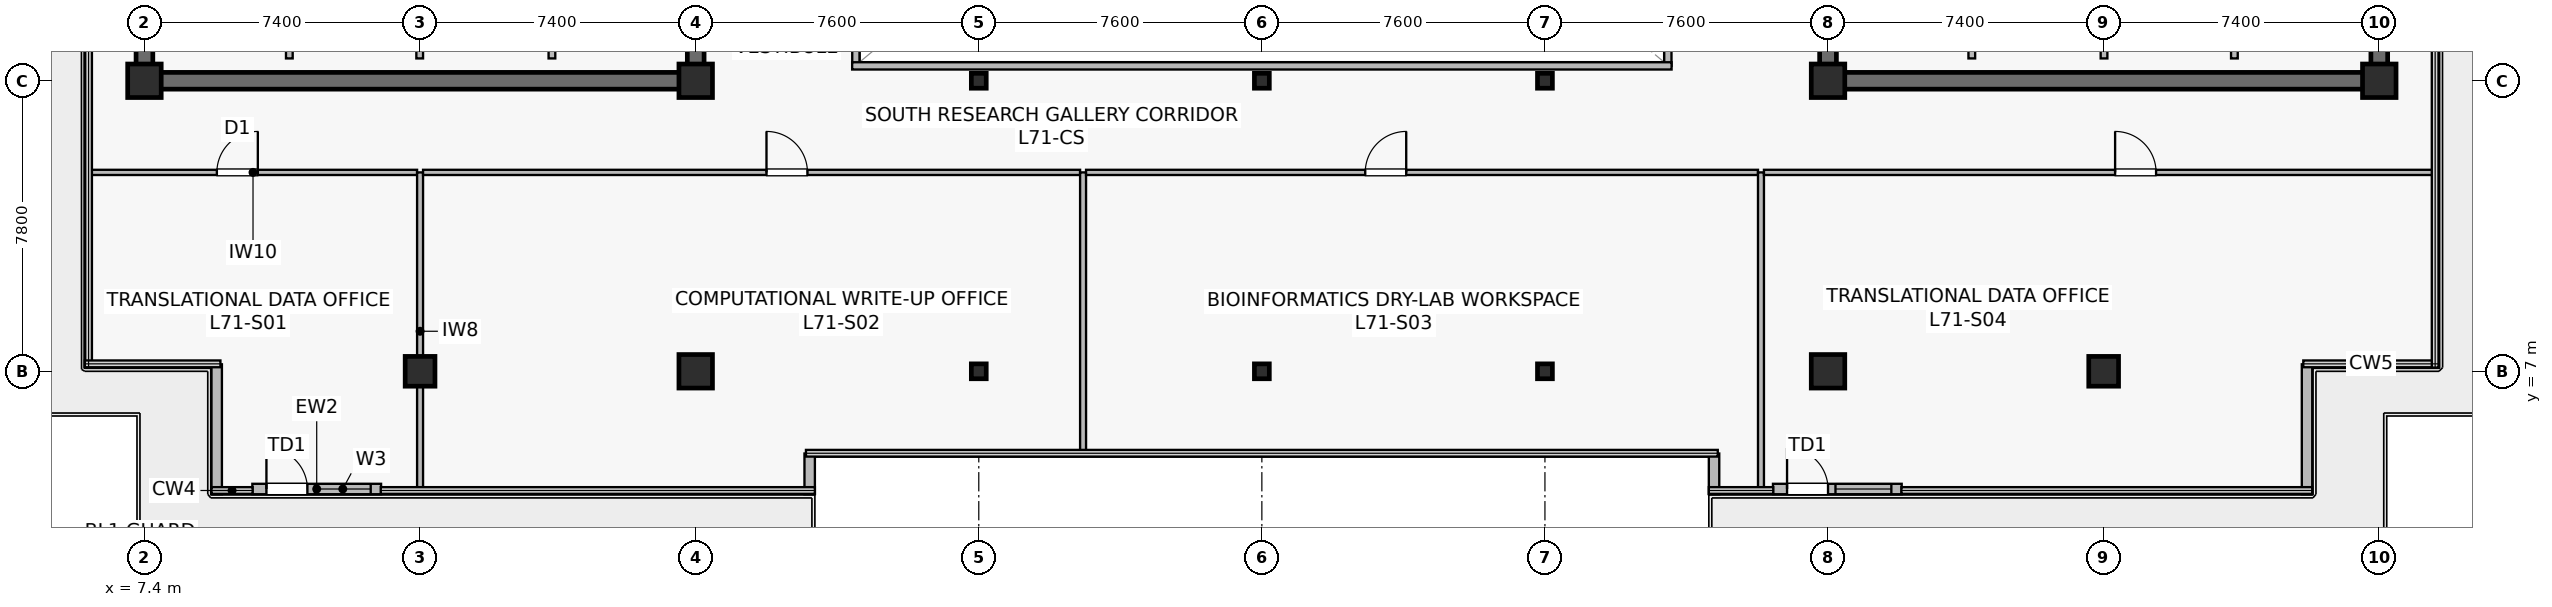
"""IFC4 building model, lengths in metres.
Left out: names, types, materials, properties, quantities, classifications, styles, units other than length and angle.
Written with IfcOpenShell. Run it as: python <this file> out.ifc"""

import sys

from ifc_helpers import new_model, si_unit, direction, frame, frame_2d, origin, origin_2d, place, context, subcontext, project, spatial, rectangle, i_section, extrude, source, transform, mapped, element, fill, save


model = new_model("IFC4")
c1 = context("Model", 3, precision=1e-05, world=origin(), true_north=direction((0.0, 1.0)))
c2 = subcontext(c1, "Body", "Model", "MODEL_VIEW")
j1 = project(units=[si_unit("LENGTHUNIT", "METRE"), si_unit("PLANEANGLEUNIT", "RADIAN")], contexts=[c1])
p1 = place(None, origin())
s1 = spatial("IfcSite", under=j1, at=p1, CompositionType="ELEMENT")
p2 = place(p1, origin())
s2 = spatial("IfcBuilding", under=s1, at=p2, CompositionType="ELEMENT")
p3 = place(p2, frame((0.0, 0.0, 297.6)))
s3 = spatial("IfcBuildingStorey", under=s2, at=p3, CompositionType="ELEMENT", Elevation=297.6)
p4 = place(p3, frame((7.175, 14.8, 0.0), z_axis=(0.0, 0.0, 1.0), x_axis=(1.0, 0.0, 0.0)))
e1 = element("IfcWall", 1, at=p4, inside=s3, PredefinedType="SHEAR", context=c2, shape_type="SweptSolid", body=[
    extrude(rectangle(XDim=15.25, YDim=0.45, at=frame_2d((7.625, 0.0))), origin(), (0.0, 0.0, 1.0), 3.9),
])
p5 = place(p3, frame((7.4, 15.025, 0.0), z_axis=(0.0, 0.0, 1.0), x_axis=(0.0, 1.0, 0.0)))
e2 = element("IfcWall", 2, at=p5, inside=s3, PredefinedType="SHEAR", context=c2, shape_type="SweptSolid", body=[
    extrude(rectangle(XDim=18.55, YDim=0.45, at=frame_2d((9.275, 0.0))), origin(), (0.0, 0.0, 1.0), 3.9),
])
p6 = place(p3, frame((22.2, 15.025, 0.0), z_axis=(0.0, 0.0, 1.0), x_axis=(0.0, 1.0, 0.0)))
e3 = element("IfcWall", 3, at=p6, inside=s3, PredefinedType="SHEAR", context=c2, shape_type="SweptSolid", body=[
    extrude(rectangle(XDim=18.55, YDim=0.45, at=frame_2d((9.275, 0.0))), origin(), (0.0, 0.0, 1.0), 3.9),
])
p7 = place(p6, frame((3.525, 0.0, 0.0)))
e4 = element("IfcOpeningElement", 4, at=p7, cuts=e3, PredefinedType="OPENING", context=c2, shape_type="SweptSolid", body=[
    extrude(rectangle(XDim=1.42, YDim=2.2, at=frame_2d((0.71, 1.1))), frame((0.0, 0.235, 0.0), z_axis=(0.0, -1.0, 0.0), x_axis=(1.0, 0.0, 0.0)), (0.0, 0.0, 1.0), 0.47),
])
p8 = place(p3, frame((52.375, 14.8, 0.0), z_axis=(0.0, 0.0, 1.0), x_axis=(1.0, 0.0, 0.0)))
e5 = element("IfcWall", 5, at=p8, inside=s3, PredefinedType="SHEAR", context=c2, shape_type="SweptSolid", body=[
    extrude(rectangle(XDim=15.25, YDim=0.45, at=frame_2d((7.625, 0.0))), origin(), (0.0, 0.0, 1.0), 3.9),
])
p9 = place(p3, frame((52.6, 15.025, 0.0), z_axis=(0.0, 0.0, 1.0), x_axis=(0.0, 1.0, 0.0)))
e6 = element("IfcWall", 6, at=p9, inside=s3, PredefinedType="SHEAR", context=c2, shape_type="SweptSolid", body=[
    extrude(rectangle(XDim=18.55, YDim=0.45, at=frame_2d((9.275, 0.0))), origin(), (0.0, 0.0, 1.0), 3.9),
])
p10 = place(p9, frame((3.525, 0.0, 0.0)))
e7 = element("IfcOpeningElement", 7, at=p10, cuts=e6, PredefinedType="OPENING", context=c2, shape_type="SweptSolid", body=[
    extrude(rectangle(XDim=1.42, YDim=2.2, at=frame_2d((0.71, 1.1))), frame((0.0, 0.235, 0.0), z_axis=(0.0, -1.0, 0.0), x_axis=(1.0, 0.0, 0.0)), (0.0, 0.0, 1.0), 0.47),
])
p11 = place(p3, frame((67.4, 15.025, 0.0), z_axis=(0.0, 0.0, 1.0), x_axis=(0.0, 1.0, 0.0)))
e8 = element("IfcWall", 8, at=p11, inside=s3, PredefinedType="SHEAR", context=c2, shape_type="SweptSolid", body=[
    extrude(rectangle(XDim=18.55, YDim=0.45, at=frame_2d((9.275, 0.0))), origin(), (0.0, 0.0, 1.0), 3.9),
])
m1 = source(origin(), c2, "Body", "SweptSolid", [
    extrude(rectangle(XDim=0.8, YDim=0.8, at=origin_2d()), origin(), (0.0, 0.0, 1.0), 4.2),
])
p12 = place(p3, frame((14.8, 7.0, 0.0), z_axis=(0.0, 0.0, 1.0), x_axis=(1.0, 0.0, 0.0)))
e9 = element("IfcColumn", 9, at=p12, inside=s3, PredefinedType="COLUMN", context=c2, shape_type="MappedRepresentation", body=[
    mapped(m1, transform((0.0, 0.0, 0.0), scale=1.0)),
])
m2 = source(origin(), c2, "Body", "SweptSolid", [
    extrude(rectangle(XDim=0.9, YDim=0.9, at=origin_2d()), origin(), (0.0, 0.0, 1.0), 4.2),
])
for number, where, z_axis, x_axis in (
    (10, (22.2, 7.0, 0.0), (0.0, 0.0, 1.0), (1.0, 0.0, 0.0)),
    (11, (7.4, 14.8, 0.0), (0.0, 0.0, 1.0), (1.0, 0.0, 0.0)),
    (12, (22.2, 14.8, 0.0), (0.0, 0.0, 1.0), (1.0, 0.0, 0.0)),
    (13, (52.6, 7.0, 0.0), (0.0, 0.0, 1.0), (1.0, 0.0, 0.0)),
):
    element("IfcColumn", number, at=place(p3, frame(where, z_axis=z_axis, x_axis=x_axis)), inside=s3, PredefinedType="COLUMN", context=c2, shape_type="MappedRepresentation", body=[
        mapped(m2, transform((0.0, 0.0, 0.0), scale=1.0)),
    ])
p13 = place(p3, frame((60.0, 7.0, 0.0), z_axis=(0.0, 0.0, 1.0), x_axis=(1.0, 0.0, 0.0)))
e14 = element("IfcColumn", 14, at=p13, inside=s3, PredefinedType="COLUMN", context=c2, shape_type="MappedRepresentation", body=[
    mapped(m1, transform((0.0, 0.0, 0.0), scale=1.0)),
])
for number, where, z_axis, x_axis in (
    (15, (52.6, 14.8, 0.0), (0.0, 0.0, 1.0), (1.0, 0.0, 0.0)),
    (16, (67.4, 14.8, 0.0), (0.0, 0.0, 1.0), (1.0, 0.0, 0.0)),
):
    element("IfcColumn", number, at=place(p3, frame(where, z_axis=z_axis, x_axis=x_axis)), inside=s3, PredefinedType="COLUMN", context=c2, shape_type="MappedRepresentation", body=[
        mapped(m2, transform((0.0, 0.0, 0.0), scale=1.0)),
    ])
m3 = source(origin(), c2, "Body", "SweptSolid", [
    extrude(i_section(OverallWidth=0.4, OverallDepth=0.4, WebThickness=0.021, FlangeThickness=0.021, at=origin_2d()), origin(), (0.0, 0.0, 1.0), 4.2),
])
for number, where, z_axis, x_axis in (
    (17, (29.8, 7.0, 0.0), (0.0, 0.0, 1.0), (1.0, 0.0, 0.0)),
    (18, (29.8, 14.8, 0.0), (0.0, 0.0, 1.0), (1.0, 0.0, 0.0)),
    (19, (37.4, 7.0, 0.0), (0.0, 0.0, 1.0), (1.0, 0.0, 0.0)),
    (20, (37.4, 14.8, 0.0), (0.0, 0.0, 1.0), (1.0, 0.0, 0.0)),
    (21, (45.0, 7.0, 0.0), (0.0, 0.0, 1.0), (1.0, 0.0, 0.0)),
    (22, (45.0, 14.8, 0.0), (0.0, 0.0, 1.0), (1.0, 0.0, 0.0)),
):
    element("IfcColumn", number, at=place(p3, frame(where, z_axis=z_axis, x_axis=x_axis)), inside=s3, PredefinedType="COLUMN", context=c2, shape_type="MappedRepresentation", body=[
        mapped(m3, transform((0.0, 0.0, 0.0), scale=1.0)),
    ])
p14 = place(p3, frame((10.297, 3.84, 0.0), z_axis=(0.0, 0.0, 1.0), x_axis=(1.0, 0.0, 0.0)))
e23 = element("IfcWall", 23, at=p14, inside=s3, PredefinedType="STANDARD", context=c2, shape_type="SweptSolid", body=[
    extrude(rectangle(XDim=3.456, YDim=0.28, at=frame_2d((1.728, 0.0))), origin(), (0.0, 0.0, 1.0), 3.9),
])
p15 = place(p14, frame((0.378, 0.0, 0.0)))
e24 = element("IfcOpeningElement", 24, at=p15, cuts=e23, PredefinedType="OPENING", context=c2, shape_type="SweptSolid", body=[
    extrude(rectangle(XDim=1.1, YDim=2.2, at=frame_2d((0.55, 1.1))), frame((0.0, 0.15, 0.0), z_axis=(0.0, -1.0, 0.0), x_axis=(1.0, 0.0, 0.0)), (0.0, 0.0, 1.0), 0.3),
])
p16 = place(p14, frame((1.678, 0.0, 0.9)))
e25 = element("IfcOpeningElement", 25, at=p16, cuts=e23, PredefinedType="OPENING", context=c2, shape_type="SweptSolid", body=[
    extrude(rectangle(XDim=1.5, YDim=2.2, at=frame_2d((0.75, 1.1))), frame((0.0, 0.15, 0.0), z_axis=(0.0, -1.0, 0.0), x_axis=(1.0, 0.0, 0.0)), (0.0, 0.0, 1.0), 0.3),
])
p17 = place(p3, frame((51.122, 3.84, 0.0), z_axis=(0.0, 0.0, 1.0), x_axis=(1.0, 0.0, 0.0)))
e26 = element("IfcWall", 26, at=p17, inside=s3, PredefinedType="STANDARD", context=c2, shape_type="SweptSolid", body=[
    extrude(rectangle(XDim=3.456, YDim=0.28, at=frame_2d((1.728, 0.0))), origin(), (0.0, 0.0, 1.0), 3.9),
])
p18 = place(p17, frame((0.378, 0.0, 0.0)))
e27 = element("IfcOpeningElement", 27, at=p18, cuts=e26, PredefinedType="OPENING", context=c2, shape_type="SweptSolid", body=[
    extrude(rectangle(XDim=1.1, YDim=2.2, at=frame_2d((0.55, 1.1))), frame((0.0, 0.15, 0.0), z_axis=(0.0, -1.0, 0.0), x_axis=(1.0, 0.0, 0.0)), (0.0, 0.0, 1.0), 0.3),
])
p19 = place(p17, frame((1.678, 0.0, 0.9)))
e28 = element("IfcOpeningElement", 28, at=p19, cuts=e26, PredefinedType="OPENING", context=c2, shape_type="SweptSolid", body=[
    extrude(rectangle(XDim=1.5, YDim=2.2, at=frame_2d((0.75, 1.1))), frame((0.0, 0.15, 0.0), z_axis=(0.0, -1.0, 0.0), x_axis=(1.0, 0.0, 0.0)), (0.0, 0.0, 1.0), 0.3),
])
for number, where, z_axis, x_axis in (
    (29, (25.26, 3.7, 0.0), (0.0, 0.0, 1.0), (0.0, 1.0, 0.0)),
    (30, (49.54, 4.793, 0.0), (0.0, 0.0, 1.0), (0.0, -1.0, 0.0)),
):
    element("IfcWall", number, at=place(p3, frame(where, z_axis=z_axis, x_axis=x_axis)), inside=s3, PredefinedType="STANDARD", context=c2, shape_type="SweptSolid", body=[
        extrude(rectangle(XDim=1.093, YDim=0.28, at=frame_2d((0.546, 0.0))), origin(), (0.0, 0.0, 1.0), 3.9),
    ])
for number, where, z_axis, x_axis in (
    (31, (65.46, 3.7, 0.0), (0.0, 0.0, 1.0), (0.0, 1.0, 0.0)),
    (32, (9.34, 7.188, 0.0), (0.0, 0.0, 1.0), (0.0, -1.0, 0.0)),
):
    element("IfcWall", number, at=place(p3, frame(where, z_axis=z_axis, x_axis=x_axis)), inside=s3, PredefinedType="STANDARD", context=c2, shape_type="SweptSolid", body=[
        extrude(rectangle(XDim=3.488, YDim=0.28, at=frame_2d((1.744, 0.0))), origin(), (0.0, 0.0, 1.0), 3.9),
    ])
p20 = place(p3, frame((11.29, 15.4, 0.0), z_axis=(0.0, 0.0, 1.0), x_axis=(0.0, 1.0, 0.0)))
e33 = element("IfcWall", 33, at=p20, inside=s3, PredefinedType="SOLIDWALL", context=c2, shape_type="SweptSolid", body=[
    extrude(rectangle(XDim=2.4, YDim=0.18, at=frame_2d((1.2, 0.0))), origin(), (0.0, 0.0, 1.0), 3.9),
])
p21 = place(p3, frame((14.79, 15.4, 0.0), z_axis=(0.0, 0.0, 1.0), x_axis=(0.0, 1.0, 0.0)))
e34 = element("IfcWall", 34, at=p21, inside=s3, PredefinedType="SOLIDWALL", context=c2, shape_type="SweptSolid", body=[
    extrude(rectangle(XDim=2.4, YDim=0.18, at=frame_2d((1.2, 0.0))), origin(), (0.0, 0.0, 1.0), 3.297),
])
for number, where, z_axis, x_axis in (
    (35, (18.34, 15.4, 0.0), (0.0, 0.0, 1.0), (0.0, 1.0, 0.0)),
    (36, (63.51, 15.4, 0.0), (0.0, 0.0, 1.0), (0.0, 1.0, 0.0)),
):
    element("IfcWall", number, at=place(p3, frame(where, z_axis=z_axis, x_axis=x_axis)), inside=s3, PredefinedType="SOLIDWALL", context=c2, shape_type="SweptSolid", body=[
        extrude(rectangle(XDim=2.4, YDim=0.18, at=frame_2d((1.2, 0.0))), origin(), (0.0, 0.0, 1.0), 3.9),
    ])
p22 = place(p3, frame((60.01, 15.4, 0.0), z_axis=(0.0, 0.0, 1.0), x_axis=(0.0, 1.0, 0.0)))
e37 = element("IfcWall", 37, at=p22, inside=s3, PredefinedType="SOLIDWALL", context=c2, shape_type="SweptSolid", body=[
    extrude(rectangle(XDim=2.4, YDim=0.18, at=frame_2d((1.2, 0.0))), origin(), (0.0, 0.0, 1.0), 3.297),
])
p23 = place(p3, frame((56.46, 15.4, 0.0), z_axis=(0.0, 0.0, 1.0), x_axis=(0.0, 1.0, 0.0)))
e38 = element("IfcWall", 38, at=p23, inside=s3, PredefinedType="SOLIDWALL", context=c2, shape_type="SweptSolid", body=[
    extrude(rectangle(XDim=2.4, YDim=0.18, at=frame_2d((1.2, 0.0))), origin(), (0.0, 0.0, 1.0), 3.9),
])
p24 = place(p3, frame((26.5, 15.2, 0.0), z_axis=(0.0, 0.0, 1.0), x_axis=(0.0, 1.0, 0.0)))
e39 = element("IfcWall", 39, at=p24, inside=s3, PredefinedType="SOLIDWALL", context=c2, shape_type="SweptSolid", body=[
    extrude(rectangle(XDim=18.2, YDim=0.195, at=frame_2d((9.1, 0.0))), origin(), (0.0, 0.0, 1.0), 3.9),
])
p25 = place(p24, frame((1.8, 0.0, 0.9)))
e40 = element("IfcOpeningElement", 40, at=p25, cuts=e39, PredefinedType="OPENING", context=c2, shape_type="SweptSolid", body=[
    extrude(rectangle(XDim=1.2, YDim=1.35, at=frame_2d((0.6, 0.675))), frame((0.0, 0.107, 0.0), z_axis=(0.0, -1.0, 0.0), x_axis=(1.0, 0.0, 0.0)), (0.0, 0.0, 1.0), 0.215),
])
p26 = place(p24, frame((13.2, 0.0, 0.9)))
e41 = element("IfcOpeningElement", 41, at=p26, cuts=e39, PredefinedType="OPENING", context=c2, shape_type="SweptSolid", body=[
    extrude(rectangle(XDim=1.2, YDim=1.35, at=frame_2d((0.6, 0.675))), frame((0.0, 0.107, 0.0), z_axis=(0.0, -1.0, 0.0), x_axis=(1.0, 0.0, 0.0)), (0.0, 0.0, 1.0), 0.215),
])
p27 = place(p3, frame((48.3, 15.2, 0.0), z_axis=(0.0, 0.0, 1.0), x_axis=(0.0, 1.0, 0.0)))
e42 = element("IfcWall", 42, at=p27, inside=s3, PredefinedType="SOLIDWALL", context=c2, shape_type="SweptSolid", body=[
    extrude(rectangle(XDim=18.2, YDim=0.195, at=frame_2d((9.1, 0.0))), origin(), (0.0, 0.0, 1.0), 3.9),
])
p28 = place(p27, frame((1.8, 0.0, 0.9)))
e43 = element("IfcOpeningElement", 43, at=p28, cuts=e42, PredefinedType="OPENING", context=c2, shape_type="SweptSolid", body=[
    extrude(rectangle(XDim=1.2, YDim=1.35, at=frame_2d((0.6, 0.675))), frame((0.0, 0.107, 0.0), z_axis=(0.0, -1.0, 0.0), x_axis=(1.0, 0.0, 0.0)), (0.0, 0.0, 1.0), 0.215),
])
p29 = place(p27, frame((13.2, 0.0, 0.9)))
e44 = element("IfcOpeningElement", 44, at=p29, cuts=e42, PredefinedType="OPENING", context=c2, shape_type="SweptSolid", body=[
    extrude(rectangle(XDim=1.2, YDim=1.35, at=frame_2d((0.6, 0.675))), frame((0.0, 0.107, 0.0), z_axis=(0.0, -1.0, 0.0), x_axis=(1.0, 0.0, 0.0)), (0.0, 0.0, 1.0), 0.215),
])
p30 = place(p3, frame((26.4, 15.2, 0.0), z_axis=(0.0, 0.0, 1.0), x_axis=(1.0, 0.0, 0.0)))
e45 = element("IfcWall", 45, at=p30, inside=s3, PredefinedType="SOLIDWALL", context=c2, shape_type="SweptSolid", body=[
    extrude(rectangle(XDim=22.0, YDim=0.195, at=frame_2d((11.0, 0.0))), origin(), (0.0, 0.0, 1.0), 3.9),
])
p31 = place(p3, frame((5.91, 12.34, 0.0), z_axis=(0.0, 0.0, 1.0), x_axis=(1.0, 0.0, 0.0)))
e46 = element("IfcWall", 46, at=p31, inside=s3, PredefinedType="PARTITIONING", context=c2, shape_type="SweptSolid", body=[
    extrude(rectangle(XDim=8.81, YDim=0.14, at=frame_2d((4.405, 0.0))), origin(), (0.0, 0.0, 1.0), 3.297),
])
p32 = place(p31, frame((3.434, 0.0, 0.0)))
e47 = element("IfcOpeningElement", 47, at=p32, cuts=e46, PredefinedType="OPENING", context=c2, shape_type="SweptSolid", body=[
    extrude(rectangle(XDim=1.1, YDim=2.18, at=frame_2d((0.55, 1.09))), frame((0.0, 0.08, 0.0), z_axis=(0.0, -1.0, 0.0), x_axis=(1.0, 0.0, 0.0)), (0.0, 0.0, 1.0), 0.16),
])
p33 = place(p3, frame((14.8, 3.81, 0.0), z_axis=(0.0, 0.0, 1.0), x_axis=(0.0, 1.0, 0.0)))
e48 = element("IfcWall", 48, at=p33, inside=s3, PredefinedType="PARTITIONING", context=c2, shape_type="SweptSolid", body=[
    extrude(rectangle(XDim=8.53, YDim=0.16, at=frame_2d((4.265, 0.0))), origin(), (0.0, 0.0, 1.0), 3.235),
])
p34 = place(p3, frame((14.88, 12.34, 0.0), z_axis=(0.0, 0.0, 1.0), x_axis=(1.0, 0.0, 0.0)))
e49 = element("IfcWall", 49, at=p34, inside=s3, PredefinedType="PARTITIONING", context=c2, shape_type="SweptSolid", body=[
    extrude(rectangle(XDim=17.64, YDim=0.14, at=frame_2d((8.82, 0.0))), origin(), (0.0, 0.0, 1.0), 3.297),
])
p35 = place(p34, frame((9.22, 0.0, 0.0)))
e50 = element("IfcOpeningElement", 50, at=p35, cuts=e49, PredefinedType="OPENING", context=c2, shape_type="SweptSolid", body=[
    extrude(rectangle(XDim=1.1, YDim=2.18, at=frame_2d((0.55, 1.09))), frame((0.0, 0.08, 0.0), z_axis=(0.0, -1.0, 0.0), x_axis=(1.0, 0.0, 0.0)), (0.0, 0.0, 1.0), 0.16),
])
p36 = place(p3, frame((32.6, 4.81, 0.0), z_axis=(0.0, 0.0, 1.0), x_axis=(0.0, 1.0, 0.0)))
e51 = element("IfcWall", 51, at=p36, inside=s3, PredefinedType="PARTITIONING", context=c2, shape_type="SweptSolid", body=[
    extrude(rectangle(XDim=7.53, YDim=0.16, at=frame_2d((3.765, 0.0))), origin(), (0.0, 0.0, 1.0), 2.985),
])
p37 = place(p3, frame((32.68, 12.34, 0.0), z_axis=(0.0, 0.0, 1.0), x_axis=(1.0, 0.0, 0.0)))
e52 = element("IfcWall", 52, at=p37, inside=s3, PredefinedType="PARTITIONING", context=c2, shape_type="SweptSolid", body=[
    extrude(rectangle(XDim=18.04, YDim=0.14, at=frame_2d((9.02, 0.0))), origin(), (0.0, 0.0, 1.0), 3.297),
])
p38 = place(p37, frame((7.496, 0.0, 0.0)))
e53 = element("IfcOpeningElement", 53, at=p38, cuts=e52, PredefinedType="OPENING", context=c2, shape_type="SweptSolid", body=[
    extrude(rectangle(XDim=1.1, YDim=2.18, at=frame_2d((0.55, 1.09))), frame((0.0, 0.08, 0.0), z_axis=(0.0, -1.0, 0.0), x_axis=(1.0, 0.0, 0.0)), (0.0, 0.0, 1.0), 0.16),
])
p39 = place(p3, frame((50.8, 3.81, 0.0), z_axis=(0.0, 0.0, 1.0), x_axis=(0.0, 1.0, 0.0)))
e54 = element("IfcWall", 54, at=p39, inside=s3, PredefinedType="PARTITIONING", context=c2, shape_type="SweptSolid", body=[
    extrude(rectangle(XDim=8.53, YDim=0.16, at=frame_2d((4.265, 0.0))), origin(), (0.0, 0.0, 1.0), 2.985),
])
p40 = place(p3, frame((50.88, 12.34, 0.0), z_axis=(0.0, 0.0, 1.0), x_axis=(1.0, 0.0, 0.0)))
e55 = element("IfcWall", 55, at=p40, inside=s3, PredefinedType="PARTITIONING", context=c2, shape_type="SweptSolid", body=[
    extrude(rectangle(XDim=18.01, YDim=0.14, at=frame_2d((9.005, 0.0))), origin(), (0.0, 0.0, 1.0), 3.297),
])
p41 = place(p40, frame((9.427, 0.0, 0.0)))
e56 = element("IfcOpeningElement", 56, at=p41, cuts=e55, PredefinedType="OPENING", context=c2, shape_type="SweptSolid", body=[
    extrude(rectangle(XDim=1.1, YDim=2.18, at=frame_2d((0.55, 1.09))), frame((0.0, 0.08, 0.0), z_axis=(0.0, -1.0, 0.0), x_axis=(1.0, 0.0, 0.0)), (0.0, 0.0, 1.0), 0.16),
])
m4 = source(origin(), c2, "Body", "SweptSolid", [
    extrude(rectangle(XDim=1.1, YDim=2.2, at=frame_2d((0.55, 1.1))), frame((0.0, 0.025, 0.0), z_axis=(0.0, -1.0, 0.0), x_axis=(1.0, 0.0, 0.0)), (0.0, 0.0, 1.0), 0.05),
])
p42 = place(p15, origin())
e57 = element("IfcDoor", 57, at=p42, inside=s3, OperationType="SINGLE_SWING_LEFT", PredefinedType="DOOR", context=c2, shape_type="MappedRepresentation", body=[
    mapped(m4, transform((0.0, 0.0, 0.0), scale=1.0)),
])
fill(e24, e57)
m5 = source(origin(), c2, "Body", "SweptSolid", [
    extrude(rectangle(XDim=1.5, YDim=2.2, at=frame_2d((0.75, 1.1))), frame((0.0, 0.03, 0.0), z_axis=(0.0, -1.0, 0.0), x_axis=(1.0, 0.0, 0.0)), (0.0, 0.0, 1.0), 0.06),
])
p43 = place(p16, origin())
e58 = element("IfcWindow", 58, at=p43, inside=s3, PartitioningType="SINGLE_PANEL", PredefinedType="WINDOW", context=c2, shape_type="MappedRepresentation", body=[
    mapped(m5, transform((0.0, 0.0, 0.0), scale=1.0)),
])
fill(e25, e58)
p44 = place(p18, origin())
e59 = element("IfcDoor", 59, at=p44, inside=s3, OperationType="SINGLE_SWING_LEFT", PredefinedType="DOOR", context=c2, shape_type="MappedRepresentation", body=[
    mapped(m4, transform((0.0, 0.0, 0.0), scale=1.0)),
])
fill(e27, e59)
p45 = place(p19, origin())
e60 = element("IfcWindow", 60, at=p45, inside=s3, PartitioningType="SINGLE_PANEL", PredefinedType="WINDOW", context=c2, shape_type="MappedRepresentation", body=[
    mapped(m5, transform((0.0, 0.0, 0.0), scale=1.0)),
])
fill(e28, e60)
m6 = source(origin(), c2, "Body", "SweptSolid", [
    extrude(rectangle(XDim=1.1, YDim=2.18, at=frame_2d((0.55, 1.09))), frame((0.0, 0.025, 0.0), z_axis=(0.0, -1.0, 0.0), x_axis=(1.0, 0.0, 0.0)), (0.0, 0.0, 1.0), 0.05),
])
p46 = place(p32, origin())
e61 = element("IfcDoor", 61, at=p46, inside=s3, OperationType="SINGLE_SWING_RIGHT", PredefinedType="DOOR", context=c2, shape_type="MappedRepresentation", body=[
    mapped(m6, transform((0.0, 0.0, 0.0), scale=1.0)),
])
fill(e47, e61)
p47 = place(p35, origin())
e62 = element("IfcDoor", 62, at=p47, inside=s3, OperationType="SINGLE_SWING_LEFT", PredefinedType="DOOR", context=c2, shape_type="MappedRepresentation", body=[
    mapped(m6, transform((0.0, 0.0, 0.0), scale=1.0)),
])
fill(e50, e62)
p48 = place(p38, origin())
e63 = element("IfcDoor", 63, at=p48, inside=s3, OperationType="SINGLE_SWING_RIGHT", PredefinedType="DOOR", context=c2, shape_type="MappedRepresentation", body=[
    mapped(m6, transform((0.0, 0.0, 0.0), scale=1.0)),
])
fill(e53, e63)
p49 = place(p41, origin())
e64 = element("IfcDoor", 64, at=p49, inside=s3, OperationType="SINGLE_SWING_LEFT", PredefinedType="DOOR", context=c2, shape_type="MappedRepresentation", body=[
    mapped(m6, transform((0.0, 0.0, 0.0), scale=1.0)),
])
fill(e56, e64)
save(model, sys.argv[1])
